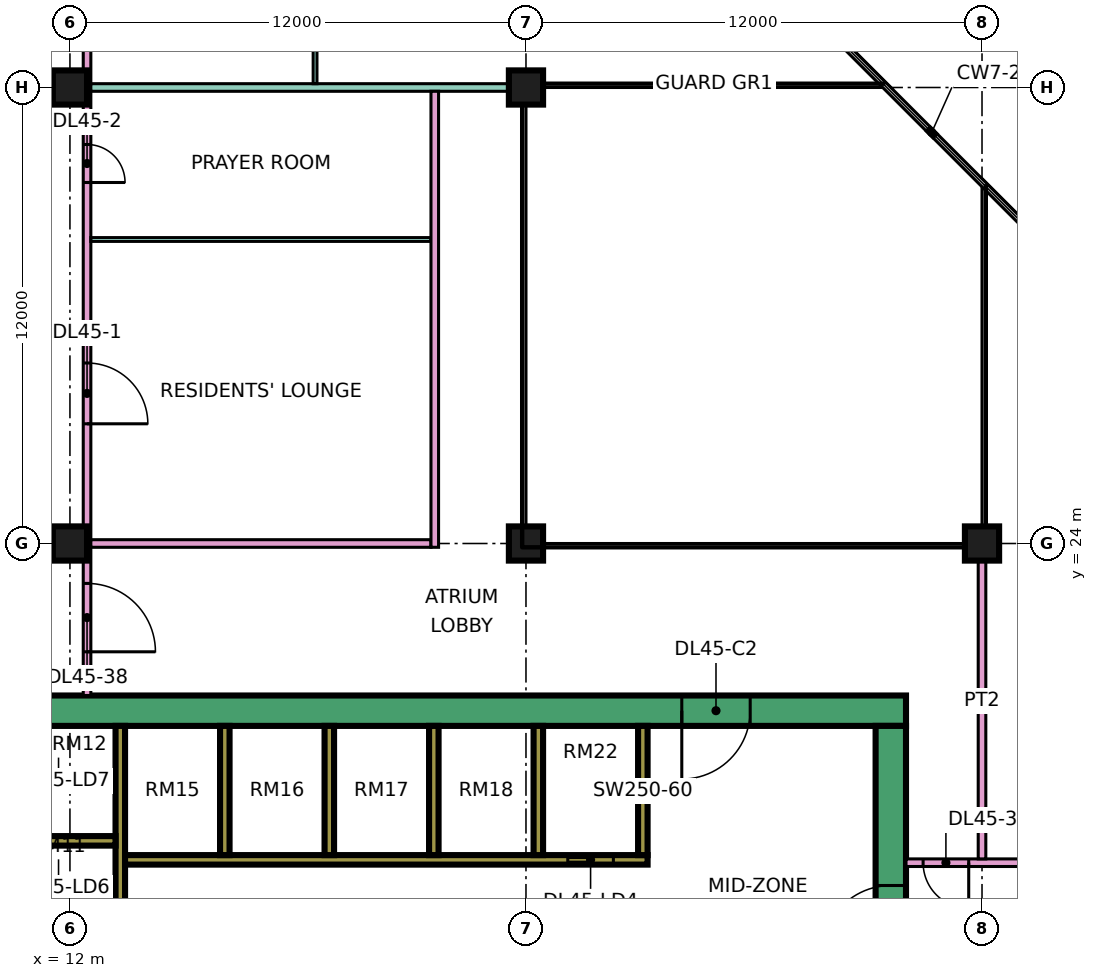
"""IFC4 building model, lengths in metres.
Left out: names, types, materials, properties, quantities, classifications, styles, units other than length and angle.
Written with IfcOpenShell. Run it as: python <this file> out.ifc"""

import sys

from ifc_helpers import new_model, si_unit, direction, frame, frame_2d, origin, origin_2d, place, context, subcontext, project, spatial, rectangle, extrude, element, fill, save


model = new_model("IFC4")
c1 = context("Model", 3, precision=1e-05, world=origin(), true_north=direction((0.0, 1.0)))
c2 = subcontext(c1, "Body", "Model", "MODEL_VIEW")
j1 = project(units=[si_unit("LENGTHUNIT", "METRE"), si_unit("PLANEANGLEUNIT", "RADIAN")], contexts=[c1])
p1 = place(None, origin())
s1 = spatial("IfcSite", under=j1, at=p1, CompositionType="ELEMENT")
p2 = place(p1, origin())
s2 = spatial("IfcBuilding", under=s1, at=p2, CompositionType="ELEMENT")
p3 = place(p2, frame((0.0, 0.0, 194.9)))
s3 = spatial("IfcBuildingStorey", under=s2, at=p3, CompositionType="ELEMENT", Elevation=194.9)
for number, where, z_axis, x_axis in (
    (1, (12.0, 24.0, 0.0), (0.0, 0.0, 1.0), (1.0, 0.0, 0.0)),
    (2, (12.0, 36.0, 0.0), (0.0, 0.0, 1.0), (1.0, 0.0, 0.0)),
    (3, (24.0, 24.0, 0.0), (0.0, 0.0, 1.0), (1.0, 0.0, 0.0)),
    (4, (24.0, 36.0, 0.0), (0.0, 0.0, 1.0), (1.0, 0.0, 0.0)),
    (5, (36.0, 24.0, 0.0), (0.0, 0.0, 1.0), (1.0, 0.0, 0.0)),
):
    element("IfcColumn", number, at=place(p3, frame(where, z_axis=z_axis, x_axis=x_axis)), inside=s3, PredefinedType="COLUMN", context=c2, shape_type="SweptSolid", body=[
        extrude(rectangle(XDim=0.9, YDim=0.9, at=origin_2d()), origin(), (0.0, 0.0, 1.0), 3.75),
    ])
p4 = place(p3, frame((9.0, 19.6, 0.0), z_axis=(0.0, 0.0, 1.0), x_axis=(1.0, 0.0, 0.0)))
e6 = element("IfcWall", 6, at=p4, inside=s3, PredefinedType="SHEAR", context=c2, shape_type="SweptSolid", body=[
    extrude(rectangle(XDim=25.0, YDim=0.8, at=frame_2d((12.5, 0.0))), origin(), (0.0, 0.0, 1.0), 3.75),
])
p5 = place(p4, frame((19.1, 0.0, 0.0)))
e7 = element("IfcOpeningElement", 7, at=p5, cuts=e6, PredefinedType="OPENING", context=c2, shape_type="SweptSolid", body=[
    extrude(rectangle(XDim=1.8, YDim=2.4, at=frame_2d((0.9, 1.2))), frame((0.0, 0.41, 0.0), z_axis=(0.0, -1.0, 0.0), x_axis=(1.0, 0.0, 0.0)), (0.0, 0.0, 1.0), 0.82),
])
p6 = place(p3, frame((33.6, 7.8, 0.0), z_axis=(0.0, 0.0, 1.0), x_axis=(0.0, 1.0, 0.0)))
e8 = element("IfcWall", 8, at=p6, inside=s3, PredefinedType="SHEAR", context=c2, shape_type="SweptSolid", body=[
    extrude(rectangle(XDim=11.4, YDim=0.8, at=frame_2d((5.7, 0.0))), origin(), (0.0, 0.0, 1.0), 3.75),
])
p7 = place(p6, frame((5.4, 0.0, 0.0)))
e9 = element("IfcOpeningElement", 9, at=p7, cuts=e8, PredefinedType="OPENING", context=c2, shape_type="SweptSolid", body=[
    extrude(rectangle(XDim=1.8, YDim=2.4, at=frame_2d((0.9, 1.2))), frame((0.0, 0.41, 0.0), z_axis=(0.0, -1.0, 0.0), x_axis=(1.0, 0.0, 0.0)), (0.0, 0.0, 1.0), 0.82),
])
p8 = place(p3, frame((13.325, 7.8, 0.0), z_axis=(0.0, 0.0, 1.0), x_axis=(0.0, 1.0, 0.0)))
e10 = element("IfcWall", 10, at=p8, inside=s3, PredefinedType="SHEAR", context=c2, shape_type="SweptSolid", body=[
    extrude(rectangle(XDim=11.4, YDim=0.25, at=frame_2d((5.7, 0.0))), origin(), (0.0, 0.0, 1.0), 3.75),
])
p9 = place(p3, frame((13.45, 15.675, 0.0), z_axis=(0.0, 0.0, 1.0), x_axis=(1.0, 0.0, 0.0)))
e11 = element("IfcWall", 11, at=p9, inside=s3, PredefinedType="SHEAR", context=c2, shape_type="SweptSolid", body=[
    extrude(rectangle(XDim=13.75, YDim=0.25, at=frame_2d((6.875, 0.0))), origin(), (0.0, 0.0, 1.0), 3.75),
])
p10 = place(p9, frame((11.65, 0.0, 0.0)))
e12 = element("IfcOpeningElement", 12, at=p10, cuts=e11, PredefinedType="OPENING", context=c2, shape_type="SweptSolid", body=[
    extrude(rectangle(XDim=1.2, YDim=2.2, at=frame_2d((0.6, 1.1))), frame((0.0, 0.135, 0.0), z_axis=(0.0, -1.0, 0.0), x_axis=(1.0, 0.0, 0.0)), (0.0, 0.0, 1.0), 0.27),
])
p11 = place(p3, frame((10.2, 16.175, 0.0), z_axis=(0.0, 0.0, 1.0), x_axis=(1.0, 0.0, 0.0)))
e13 = element("IfcWall", 13, at=p11, inside=s3, PredefinedType="SHEAR", context=c2, shape_type="SweptSolid", body=[
    extrude(rectangle(XDim=3.0, YDim=0.25, at=frame_2d((1.5, 0.0))), origin(), (0.0, 0.0, 1.0), 3.75),
])
for number, where, z_axis, x_axis in (
    (14, (16.075, 15.8, 0.0), (0.0, 0.0, 1.0), (0.0, 1.0, 0.0)),
    (15, (18.825, 15.8, 0.0), (0.0, 0.0, 1.0), (0.0, 1.0, 0.0)),
    (16, (21.575, 15.8, 0.0), (0.0, 0.0, 1.0), (0.0, 1.0, 0.0)),
    (17, (24.325, 15.8, 0.0), (0.0, 0.0, 1.0), (0.0, 1.0, 0.0)),
    (18, (27.075, 15.8, 0.0), (0.0, 0.0, 1.0), (0.0, 1.0, 0.0)),
):
    element("IfcWall", number, at=place(p3, frame(where, z_axis=z_axis, x_axis=x_axis)), inside=s3, PredefinedType="SHEAR", context=c2, shape_type="SweptSolid", body=[
        extrude(rectangle(XDim=3.4, YDim=0.25, at=frame_2d((1.7, 0.0))), origin(), (0.0, 0.0, 1.0), 3.75),
    ])
p12 = place(p3, frame((12.45, 20.0, 0.0), z_axis=(0.0, 0.0, 1.0), x_axis=(0.0, 1.0, 0.0)))
e19 = element("IfcWall", 19, at=p12, inside=s3, PredefinedType="PARTITIONING", context=c2, shape_type="SweptSolid", body=[
    extrude(rectangle(XDim=42.926, YDim=0.2, at=frame_2d((21.463, 0.0))), origin(), (0.0, 0.0, 1.0), 3.35),
])
p13 = place(p12, frame((7.15, 0.0, 0.0)))
e20 = element("IfcOpeningElement", 20, at=p13, cuts=e19, PredefinedType="OPENING", context=c2, shape_type="SweptSolid", body=[
    extrude(rectangle(XDim=1.6, YDim=2.1, at=frame_2d((0.8, 1.05))), frame((0.0, 0.11, 0.0), z_axis=(0.0, -1.0, 0.0), x_axis=(1.0, 0.0, 0.0)), (0.0, 0.0, 1.0), 0.22),
])
p14 = place(p12, frame((13.5, 0.0, 0.0)))
e21 = element("IfcOpeningElement", 21, at=p14, cuts=e19, PredefinedType="OPENING", context=c2, shape_type="SweptSolid", body=[
    extrude(rectangle(XDim=1.0, YDim=2.1, at=frame_2d((0.5, 1.05))), frame((0.0, 0.11, 0.0), z_axis=(0.0, -1.0, 0.0), x_axis=(1.0, 0.0, 0.0)), (0.0, 0.0, 1.0), 0.22),
])
p15 = place(p12, frame((17.2, 0.0, 0.0)))
e22 = element("IfcOpeningElement", 22, at=p15, cuts=e19, PredefinedType="OPENING", context=c2, shape_type="SweptSolid", body=[
    extrude(rectangle(XDim=1.0, YDim=2.1, at=frame_2d((0.5, 1.05))), frame((0.0, 0.11, 0.0), z_axis=(0.0, -1.0, 0.0), x_axis=(1.0, 0.0, 0.0)), (0.0, 0.0, 1.0), 0.22),
])
p16 = place(p12, frame((35.2, 0.0, 0.0)))
e23 = element("IfcOpeningElement", 23, at=p16, cuts=e19, PredefinedType="OPENING", context=c2, shape_type="SweptSolid", body=[
    extrude(rectangle(XDim=1.0, YDim=2.1, at=frame_2d((0.5, 1.05))), frame((0.0, 0.11, 0.0), z_axis=(0.0, -1.0, 0.0), x_axis=(1.0, 0.0, 0.0)), (0.0, 0.0, 1.0), 0.22),
])
p17 = place(p12, frame((1.15, 0.0, 0.0)))
e24 = element("IfcOpeningElement", 24, at=p17, cuts=e19, PredefinedType="OPENING", context=c2, shape_type="SweptSolid", body=[
    extrude(rectangle(XDim=1.8, YDim=2.1, at=frame_2d((0.9, 1.05))), frame((0.0, 0.11, 0.0), z_axis=(0.0, -1.0, 0.0), x_axis=(1.0, 0.0, 0.0)), (0.0, 0.0, 1.0), 0.22),
])
p18 = place(p12, frame((28.6, 0.0, 0.0)))
e25 = element("IfcOpeningElement", 25, at=p18, cuts=e19, PredefinedType="OPENING", context=c2, shape_type="SweptSolid", body=[
    extrude(rectangle(XDim=1.8, YDim=2.1, at=frame_2d((0.9, 1.05))), frame((0.0, 0.11, 0.0), z_axis=(0.0, -1.0, 0.0), x_axis=(1.0, 0.0, 0.0)), (0.0, 0.0, 1.0), 0.22),
])
p19 = place(p3, frame((12.55, 24.0, 0.0), z_axis=(0.0, 0.0, 1.0), x_axis=(1.0, 0.0, 0.0)))
e26 = element("IfcWall", 26, at=p19, inside=s3, PredefinedType="PARTITIONING", context=c2, shape_type="SweptSolid", body=[
    extrude(rectangle(XDim=8.95, YDim=0.2, at=frame_2d((4.475, 0.0))), origin(), (0.0, 0.0, 1.0), 3.35),
])
p20 = place(p3, frame((12.55, 32.0, 0.0), z_axis=(0.0, 0.0, 1.0), x_axis=(1.0, 0.0, 0.0)))
e27 = element("IfcWall", 27, at=p20, inside=s3, PredefinedType="PARTITIONING", context=c2, shape_type="SweptSolid", body=[
    extrude(rectangle(XDim=8.95, YDim=0.1, at=frame_2d((4.475, 0.0))), origin(), (0.0, 0.0, 1.0), 3.35),
])
p21 = place(p3, frame((12.55, 36.0, 0.0), z_axis=(0.0, 0.0, 1.0), x_axis=(1.0, 0.0, 0.0)))
e28 = element("IfcWall", 28, at=p21, inside=s3, PredefinedType="PARTITIONING", context=c2, shape_type="SweptSolid", body=[
    extrude(rectangle(XDim=11.45, YDim=0.2, at=frame_2d((5.725, 0.0))), origin(), (0.0, 0.0, 1.0), 3.35),
])
p22 = place(p3, frame((18.45, 36.1, 0.0), z_axis=(0.0, 0.0, 1.0), x_axis=(0.0, 1.0, 0.0)))
e29 = element("IfcWall", 29, at=p22, inside=s3, PredefinedType="PARTITIONING", context=c2, shape_type="SweptSolid", body=[
    extrude(rectangle(XDim=5.95, YDim=0.1, at=frame_2d((2.975, 0.0))), origin(), (0.0, 0.0, 1.0), 3.35),
])
p23 = place(p22, frame((0.95, 0.0, 0.0)))
e30 = element("IfcOpeningElement", 30, at=p23, cuts=e29, PredefinedType="OPENING", context=c2, shape_type="SweptSolid", body=[
    extrude(rectangle(XDim=0.9, YDim=2.1, at=frame_2d((0.45, 1.05))), frame((0.0, 0.06, 0.0), z_axis=(0.0, -1.0, 0.0), x_axis=(1.0, 0.0, 0.0)), (0.0, 0.0, 1.0), 0.12),
])
p24 = place(p22, frame((3.95, 0.0, 0.0)))
e31 = element("IfcOpeningElement", 31, at=p24, cuts=e29, PredefinedType="OPENING", context=c2, shape_type="SweptSolid", body=[
    extrude(rectangle(XDim=0.9, YDim=2.1, at=frame_2d((0.45, 1.05))), frame((0.0, 0.06, 0.0), z_axis=(0.0, -1.0, 0.0), x_axis=(1.0, 0.0, 0.0)), (0.0, 0.0, 1.0), 0.12),
])
p25 = place(p3, frame((21.6, 23.9, 0.0), z_axis=(0.0, 0.0, 1.0), x_axis=(0.0, 1.0, 0.0)))
e32 = element("IfcWall", 32, at=p25, inside=s3, PredefinedType="PARTITIONING", context=c2, shape_type="SweptSolid", body=[
    extrude(rectangle(XDim=12.0, YDim=0.2, at=frame_2d((6.0, 0.0))), origin(), (0.0, 0.0, 1.0), 3.35),
])
p26 = place(p3, frame((34.0, 15.6, 0.0), z_axis=(0.0, 0.0, 1.0), x_axis=(1.0, 0.0, 0.0)))
e33 = element("IfcWall", 33, at=p26, inside=s3, PredefinedType="PARTITIONING", context=c2, shape_type="SweptSolid", body=[
    extrude(rectangle(XDim=10.35, YDim=0.2, at=frame_2d((5.175, 0.0))), origin(), (0.0, 0.0, 1.0), 3.35),
])
p27 = place(p26, frame((5.6, 0.0, 0.0)))
e34 = element("IfcOpeningElement", 34, at=p27, cuts=e33, PredefinedType="OPENING", context=c2, shape_type="SweptSolid", body=[
    extrude(rectangle(XDim=1.0, YDim=2.1, at=frame_2d((0.5, 1.05))), frame((0.0, 0.11, 0.0), z_axis=(0.0, -1.0, 0.0), x_axis=(1.0, 0.0, 0.0)), (0.0, 0.0, 1.0), 0.22),
])
p28 = place(p26, frame((0.45, 0.0, 0.0)))
e35 = element("IfcOpeningElement", 35, at=p28, cuts=e33, PredefinedType="OPENING", context=c2, shape_type="SweptSolid", body=[
    extrude(rectangle(XDim=1.2, YDim=2.1, at=frame_2d((0.6, 1.05))), frame((0.0, 0.11, 0.0), z_axis=(0.0, -1.0, 0.0), x_axis=(1.0, 0.0, 0.0)), (0.0, 0.0, 1.0), 0.22),
])
p29 = place(p3, frame((36.0, 15.7, 0.0), z_axis=(0.0, 0.0, 1.0), x_axis=(0.0, 1.0, 0.0)))
e36 = element("IfcWall", 36, at=p29, inside=s3, PredefinedType="PARTITIONING", context=c2, shape_type="SweptSolid", body=[
    extrude(rectangle(XDim=8.3, YDim=0.2, at=frame_2d((4.15, 0.0))), origin(), (0.0, 0.0, 1.0), 3.35),
])
p30 = place(p10, origin())
e37 = element("IfcDoor", 37, at=p30, inside=s3, OperationType="DOUBLE_DOOR_SLIDING", PredefinedType="DOOR", context=c2, shape_type="SweptSolid", body=[
    extrude(rectangle(XDim=1.2, YDim=2.2, at=frame_2d((0.6, 1.1))), frame((0.0, 0.025, 0.0), z_axis=(0.0, -1.0, 0.0), x_axis=(1.0, 0.0, 0.0)), (0.0, 0.0, 1.0), 0.05),
])
fill(e12, e37)
p31 = place(p7, origin())
e38 = element("IfcDoor", 38, at=p31, inside=s3, OperationType="DOUBLE_DOOR_SINGLE_SWING", PredefinedType="DOOR", context=c2, shape_type="SweptSolid", body=[
    extrude(rectangle(XDim=1.8, YDim=2.4, at=frame_2d((0.9, 1.2))), frame((0.0, 0.025, 0.0), z_axis=(0.0, -1.0, 0.0), x_axis=(1.0, 0.0, 0.0)), (0.0, 0.0, 1.0), 0.05),
])
fill(e9, e38)
p32 = place(p5, frame((1.8, 0.0, 0.0), z_axis=(0.0, 0.0, 1.0), x_axis=(-1.0, 0.0, 0.0)))
e39 = element("IfcDoor", 39, at=p32, inside=s3, OperationType="DOUBLE_DOOR_SINGLE_SWING", PredefinedType="DOOR", context=c2, shape_type="SweptSolid", body=[
    extrude(rectangle(XDim=1.8, YDim=2.4, at=frame_2d((0.9, 1.2))), frame((0.0, 0.025, 0.0), z_axis=(0.0, -1.0, 0.0), x_axis=(1.0, 0.0, 0.0)), (0.0, 0.0, 1.0), 0.05),
])
fill(e7, e39)
p33 = place(p13, frame((1.6, 0.0, 0.0), z_axis=(0.0, 0.0, 1.0), x_axis=(-1.0, 0.0, 0.0)))
e40 = element("IfcDoor", 40, at=p33, inside=s3, OperationType="DOUBLE_DOOR_SINGLE_SWING", PredefinedType="DOOR", context=c2, shape_type="SweptSolid", body=[
    extrude(rectangle(XDim=1.6, YDim=2.1, at=frame_2d((0.8, 1.05))), frame((0.0, 0.025, 0.0), z_axis=(0.0, -1.0, 0.0), x_axis=(1.0, 0.0, 0.0)), (0.0, 0.0, 1.0), 0.05),
])
fill(e20, e40)
p34 = place(p14, frame((1.0, 0.0, 0.0), z_axis=(0.0, 0.0, 1.0), x_axis=(-1.0, 0.0, 0.0)))
e41 = element("IfcDoor", 41, at=p34, inside=s3, OperationType="SINGLE_SWING_LEFT", PredefinedType="DOOR", context=c2, shape_type="SweptSolid", body=[
    extrude(rectangle(XDim=1.0, YDim=2.1, at=frame_2d((0.5, 1.05))), frame((0.0, 0.025, 0.0), z_axis=(0.0, -1.0, 0.0), x_axis=(1.0, 0.0, 0.0)), (0.0, 0.0, 1.0), 0.05),
])
fill(e21, e41)
p35 = place(p28, origin())
e42 = element("IfcDoor", 42, at=p35, inside=s3, OperationType="SINGLE_SWING_RIGHT", PredefinedType="DOOR", context=c2, shape_type="SweptSolid", body=[
    extrude(rectangle(XDim=1.2, YDim=2.1, at=frame_2d((0.6, 1.05))), frame((0.0, 0.025, 0.0), z_axis=(0.0, -1.0, 0.0), x_axis=(1.0, 0.0, 0.0)), (0.0, 0.0, 1.0), 0.05),
])
fill(e35, e42)
p36 = place(p17, frame((1.8, 0.0, 0.0), z_axis=(0.0, 0.0, 1.0), x_axis=(-1.0, 0.0, 0.0)))
e43 = element("IfcDoor", 43, at=p36, inside=s3, OperationType="DOUBLE_DOOR_SINGLE_SWING", PredefinedType="DOOR", context=c2, shape_type="SweptSolid", body=[
    extrude(rectangle(XDim=1.8, YDim=2.1, at=frame_2d((0.9, 1.05))), frame((0.0, 0.025, 0.0), z_axis=(0.0, -1.0, 0.0), x_axis=(1.0, 0.0, 0.0)), (0.0, 0.0, 1.0), 0.05),
])
fill(e24, e43)
save(model, sys.argv[1])
